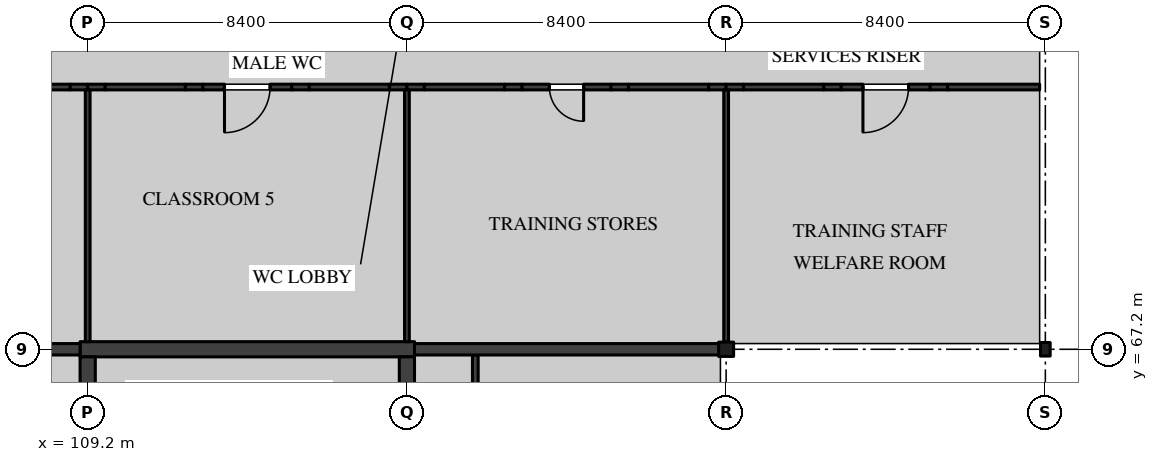
"""IFC4 building model, lengths in metres.
Left out: names, types, materials, properties, quantities, classifications, styles, units other than length and angle.
Written with IfcOpenShell. Run it as: python <this file> out.ifc"""

import sys

from ifc_helpers import new_model, si_unit, direction, frame, frame_2d, origin, origin_2d, place, context, subcontext, project, spatial, rectangle, i_section, extrude, element, fill, save


model = new_model("IFC4")
c1 = context("Model", 3, precision=1e-05, world=origin(), true_north=direction((0.0, 1.0)))
c2 = subcontext(c1, "Body", "Model", "MODEL_VIEW")
j1 = project(units=[si_unit("LENGTHUNIT", "METRE"), si_unit("PLANEANGLEUNIT", "RADIAN")], contexts=[c1])
p1 = place(None, origin())
s1 = spatial("IfcSite", under=j1, at=p1, CompositionType="ELEMENT")
p2 = place(p1, origin())
s2 = spatial("IfcBuilding", under=s1, at=p2, CompositionType="ELEMENT")
p3 = place(p2, frame((0.0, 0.0, 9.9)))
s3 = spatial("IfcBuildingStorey", under=s2, at=p3, CompositionType="ELEMENT", Elevation=9.9)
p4 = place(p3, frame((126.0, 67.2, 0.0), z_axis=(0.0, 0.0, 1.0), x_axis=(1.0, 0.0, 0.0)))
e1 = element("IfcColumn", 1, at=p4, inside=s3, PredefinedType="COLUMN", context=c2, shape_type="SweptSolid", body=[
    extrude(i_section(OverallWidth=0.394, OverallDepth=0.376, WebThickness=0.017, FlangeThickness=0.028, FilletRadius=0.015, at=origin_2d()), origin(), (0.0, 0.0, 1.0), 4.37),
])
p5 = place(p3, frame((134.4, 67.2, 0.0), z_axis=(0.0, 0.0, 1.0), x_axis=(1.0, 0.0, 0.0)))
e2 = element("IfcColumn", 2, at=p5, inside=s3, PredefinedType="COLUMN", context=c2, shape_type="SweptSolid", body=[
    extrude(i_section(OverallWidth=0.254, OverallDepth=0.356, WebThickness=0.01, FlangeThickness=0.018, FilletRadius=0.015, at=origin_2d()), origin(), (0.0, 0.0, 1.0), 4.37),
])
p6 = place(p3, frame((109.0, 67.2, 0.0), z_axis=(0.0, 0.0, 1.0), x_axis=(1.0, 0.0, 0.0)))
e3 = element("IfcWall", 3, at=p6, inside=s3, PredefinedType="SHEAR", context=c2, shape_type="SweptSolid", body=[
    extrude(rectangle(XDim=8.8, YDim=0.4, at=frame_2d((4.4, 0.0))), origin(), (0.0, 0.0, 1.0), 4.37),
])
p7 = place(p3, frame((109.2, 59.0, 0.0), z_axis=(0.0, 0.0, 1.0), x_axis=(0.0, 1.0, 0.0)))
e4 = element("IfcWall", 4, at=p7, inside=s3, PredefinedType="SHEAR", context=c2, shape_type="SweptSolid", body=[
    extrude(rectangle(XDim=8.0, YDim=0.4, at=frame_2d((4.0, 0.0))), origin(), (0.0, 0.0, 1.0), 4.37),
])
p8 = place(p7, frame((2.925, 0.0, 0.0)))
e5 = element("IfcOpeningElement", 5, at=p8, cuts=e4, PredefinedType="OPENING", context=c2, shape_type="SweptSolid", body=[
    extrude(rectangle(XDim=1.2, YDim=2.1, at=frame_2d((0.6, 1.05))), frame((0.0, 0.21, 0.0), z_axis=(0.0, -1.0, 0.0), x_axis=(1.0, 0.0, 0.0)), (0.0, 0.0, 1.0), 0.42),
])
p9 = place(p3, frame((117.6, 59.0, 0.0), z_axis=(0.0, 0.0, 1.0), x_axis=(0.0, 1.0, 0.0)))
e6 = element("IfcWall", 6, at=p9, inside=s3, PredefinedType="SHEAR", context=c2, shape_type="SweptSolid", body=[
    extrude(rectangle(XDim=8.0, YDim=0.4, at=frame_2d((4.0, 0.0))), origin(), (0.0, 0.0, 1.0), 4.37),
])
p10 = place(p9, frame((2.925, 0.0, 0.0)))
e7 = element("IfcOpeningElement", 7, at=p10, cuts=e6, PredefinedType="OPENING", context=c2, shape_type="SweptSolid", body=[
    extrude(rectangle(XDim=1.2, YDim=2.1, at=frame_2d((0.6, 1.05))), frame((0.0, 0.21, 0.0), z_axis=(0.0, -1.0, 0.0), x_axis=(1.0, 0.0, 0.0)), (0.0, 0.0, 1.0), 0.42),
])
p11 = place(p3, frame((119.4, 59.03, 0.0), z_axis=(0.0, 0.0, 1.0), x_axis=(0.0, 1.0, 0.0)))
e8 = element("IfcWall", 8, at=p11, inside=s3, PredefinedType="PARTITIONING", context=c2, shape_type="SweptSolid", body=[
    extrude(rectangle(XDim=8.02, YDim=0.15, at=frame_2d((4.01, 0.0))), origin(), (0.0, 0.0, 1.0), 4.37),
])
p12 = place(p11, frame((1.27, 0.0, 0.0)))
e9 = element("IfcOpeningElement", 9, at=p12, cuts=e8, PredefinedType="OPENING", context=c2, shape_type="SweptSolid", body=[
    extrude(rectangle(XDim=0.9, YDim=2.1, at=frame_2d((0.45, 1.05))), frame((0.0, 0.085, 0.0), z_axis=(0.0, -1.0, 0.0), x_axis=(1.0, 0.0, 0.0)), (0.0, 0.0, 1.0), 0.17),
])
p13 = place(p3, frame((106.63, 74.1, 0.0), z_axis=(0.0, 0.0, 1.0), x_axis=(1.0, 0.0, 0.0)))
e10 = element("IfcWall", 10, at=p13, inside=s3, PredefinedType="PARTITIONING", context=c2, shape_type="SweptSolid", body=[
    extrude(rectangle(XDim=2.11, YDim=0.15, at=frame_2d((1.055, 0.0))), origin(), (0.0, 0.0, 1.0), 4.37),
])
for number, where, z_axis, x_axis in (
    (11, (108.74, 74.1, 0.0), (0.0, 0.0, 1.0), (1.0, 0.0, 0.0)),
    (12, (109.2, 74.1, 0.0), (0.0, 0.0, 1.0), (1.0, 0.0, 0.0)),
):
    element("IfcWall", number, at=place(p3, frame(where, z_axis=z_axis, x_axis=x_axis)), inside=s3, PredefinedType="PARTITIONING", context=c2, shape_type="SweptSolid", body=[
        extrude(rectangle(XDim=0.46, YDim=0.15, at=frame_2d((0.23, 0.0))), origin(), (0.0, 0.0, 1.0), 3.746),
    ])
p14 = place(p3, frame((109.66, 74.1, 0.0), z_axis=(0.0, 0.0, 1.0), x_axis=(1.0, 0.0, 0.0)))
e13 = element("IfcWall", 13, at=p14, inside=s3, PredefinedType="PARTITIONING", context=c2, shape_type="SweptSolid", body=[
    extrude(rectangle(XDim=2.11, YDim=0.15, at=frame_2d((1.055, 0.0))), origin(), (0.0, 0.0, 1.0), 4.37),
])
p15 = place(p3, frame((111.77, 74.1, 0.0), z_axis=(0.0, 0.0, 1.0), x_axis=(1.0, 0.0, 0.0)))
e14 = element("IfcWall", 14, at=p15, inside=s3, PredefinedType="PARTITIONING", context=c2, shape_type="SweptSolid", body=[
    extrude(rectangle(XDim=0.46, YDim=0.15, at=frame_2d((0.23, 0.0))), origin(), (0.0, 0.0, 1.0), 3.895),
])
p16 = place(p3, frame((112.23, 74.1, 0.0), z_axis=(0.0, 0.0, 1.0), x_axis=(1.0, 0.0, 0.0)))
e15 = element("IfcWall", 15, at=p16, inside=s3, PredefinedType="PARTITIONING", context=c2, shape_type="SweptSolid", body=[
    extrude(rectangle(XDim=2.34, YDim=0.15, at=frame_2d((1.17, 0.0))), origin(), (0.0, 0.0, 1.0), 4.37),
])
p17 = place(p16, frame((0.57, 0.0, 0.0)))
e16 = element("IfcOpeningElement", 16, at=p17, cuts=e15, PredefinedType="OPENING", context=c2, shape_type="SweptSolid", body=[
    extrude(rectangle(XDim=1.2, YDim=2.4, at=frame_2d((0.6, 1.2))), frame((0.0, 0.085, 0.0), z_axis=(0.0, -1.0, 0.0), x_axis=(1.0, 0.0, 0.0)), (0.0, 0.0, 1.0), 0.17),
])
p18 = place(p3, frame((114.57, 74.1, 0.0), z_axis=(0.0, 0.0, 1.0), x_axis=(1.0, 0.0, 0.0)))
e17 = element("IfcWall", 17, at=p18, inside=s3, PredefinedType="PARTITIONING", context=c2, shape_type="SweptSolid", body=[
    extrude(rectangle(XDim=0.46, YDim=0.15, at=frame_2d((0.23, 0.0))), origin(), (0.0, 0.0, 1.0), 3.895),
])
p19 = place(p3, frame((115.03, 74.1, 0.0), z_axis=(0.0, 0.0, 1.0), x_axis=(1.0, 0.0, 0.0)))
e18 = element("IfcWall", 18, at=p19, inside=s3, PredefinedType="PARTITIONING", context=c2, shape_type="SweptSolid", body=[
    extrude(rectangle(XDim=2.11, YDim=0.15, at=frame_2d((1.055, 0.0))), origin(), (0.0, 0.0, 1.0), 4.37),
])
p20 = place(p3, frame((117.14, 74.1, 0.0), z_axis=(0.0, 0.0, 1.0), x_axis=(1.0, 0.0, 0.0)))
e19 = element("IfcWall", 19, at=p20, inside=s3, PredefinedType="PARTITIONING", context=c2, shape_type="SweptSolid", body=[
    extrude(rectangle(XDim=0.46, YDim=0.15, at=frame_2d((0.23, 0.0))), origin(), (0.0, 0.0, 1.0), 3.746),
])
p21 = place(p3, frame((117.6, 74.1, 0.0), z_axis=(0.0, 0.0, 1.0), x_axis=(1.0, 0.0, 0.0)))
e20 = element("IfcWall", 20, at=p21, inside=s3, PredefinedType="PARTITIONING", context=c2, shape_type="SweptSolid", body=[
    extrude(rectangle(XDim=0.46, YDim=0.15, at=frame_2d((0.23, 0.0))), origin(), (0.0, 0.0, 1.0), 3.746),
])
p22 = place(p3, frame((118.06, 74.1, 0.0), z_axis=(0.0, 0.0, 1.0), x_axis=(1.0, 0.0, 0.0)))
e21 = element("IfcWall", 21, at=p22, inside=s3, PredefinedType="PARTITIONING", context=c2, shape_type="SweptSolid", body=[
    extrude(rectangle(XDim=2.11, YDim=0.15, at=frame_2d((1.055, 0.0))), origin(), (0.0, 0.0, 1.0), 4.37),
])
p23 = place(p3, frame((120.17, 74.1, 0.0), z_axis=(0.0, 0.0, 1.0), x_axis=(1.0, 0.0, 0.0)))
e22 = element("IfcWall", 22, at=p23, inside=s3, PredefinedType="PARTITIONING", context=c2, shape_type="SweptSolid", body=[
    extrude(rectangle(XDim=0.46, YDim=0.15, at=frame_2d((0.23, 0.0))), origin(), (0.0, 0.0, 1.0), 3.895),
])
p24 = place(p3, frame((120.63, 74.1, 0.0), z_axis=(0.0, 0.0, 1.0), x_axis=(1.0, 0.0, 0.0)))
e23 = element("IfcWall", 23, at=p24, inside=s3, PredefinedType="PARTITIONING", context=c2, shape_type="SweptSolid", body=[
    extrude(rectangle(XDim=2.34, YDim=0.15, at=frame_2d((1.17, 0.0))), origin(), (0.0, 0.0, 1.0), 4.37),
])
p25 = place(p24, frame((0.72, 0.0, 0.0)))
e24 = element("IfcOpeningElement", 24, at=p25, cuts=e23, PredefinedType="OPENING", context=c2, shape_type="SweptSolid", body=[
    extrude(rectangle(XDim=0.9, YDim=2.1, at=frame_2d((0.45, 1.05))), frame((0.0, 0.085, 0.0), z_axis=(0.0, -1.0, 0.0), x_axis=(1.0, 0.0, 0.0)), (0.0, 0.0, 1.0), 0.17),
])
p26 = place(p3, frame((122.97, 74.1, 0.0), z_axis=(0.0, 0.0, 1.0), x_axis=(1.0, 0.0, 0.0)))
e25 = element("IfcWall", 25, at=p26, inside=s3, PredefinedType="PARTITIONING", context=c2, shape_type="SweptSolid", body=[
    extrude(rectangle(XDim=0.46, YDim=0.15, at=frame_2d((0.23, 0.0))), origin(), (0.0, 0.0, 1.0), 3.895),
])
p27 = place(p3, frame((123.43, 74.1, 0.0), z_axis=(0.0, 0.0, 1.0), x_axis=(1.0, 0.0, 0.0)))
e26 = element("IfcWall", 26, at=p27, inside=s3, PredefinedType="PARTITIONING", context=c2, shape_type="SweptSolid", body=[
    extrude(rectangle(XDim=2.11, YDim=0.15, at=frame_2d((1.055, 0.0))), origin(), (0.0, 0.0, 1.0), 4.37),
])
for number, where, z_axis, x_axis in (
    (27, (125.54, 74.1, 0.0), (0.0, 0.0, 1.0), (1.0, 0.0, 0.0)),
    (28, (126.0, 74.1, 0.0), (0.0, 0.0, 1.0), (1.0, 0.0, 0.0)),
):
    element("IfcWall", number, at=place(p3, frame(where, z_axis=z_axis, x_axis=x_axis)), inside=s3, PredefinedType="PARTITIONING", context=c2, shape_type="SweptSolid", body=[
        extrude(rectangle(XDim=0.46, YDim=0.15, at=frame_2d((0.23, 0.0))), origin(), (0.0, 0.0, 1.0), 3.746),
    ])
p28 = place(p3, frame((126.46, 74.1, 0.0), z_axis=(0.0, 0.0, 1.0), x_axis=(1.0, 0.0, 0.0)))
e29 = element("IfcWall", 29, at=p28, inside=s3, PredefinedType="PARTITIONING", context=c2, shape_type="SweptSolid", body=[
    extrude(rectangle(XDim=2.11, YDim=0.15, at=frame_2d((1.055, 0.0))), origin(), (0.0, 0.0, 1.0), 4.37),
])
p29 = place(p3, frame((128.57, 74.1, 0.0), z_axis=(0.0, 0.0, 1.0), x_axis=(1.0, 0.0, 0.0)))
e30 = element("IfcWall", 30, at=p29, inside=s3, PredefinedType="PARTITIONING", context=c2, shape_type="SweptSolid", body=[
    extrude(rectangle(XDim=0.46, YDim=0.15, at=frame_2d((0.23, 0.0))), origin(), (0.0, 0.0, 1.0), 3.895),
])
p30 = place(p3, frame((129.03, 74.1, 0.0), z_axis=(0.0, 0.0, 1.0), x_axis=(1.0, 0.0, 0.0)))
e31 = element("IfcWall", 31, at=p30, inside=s3, PredefinedType="PARTITIONING", context=c2, shape_type="SweptSolid", body=[
    extrude(rectangle(XDim=2.34, YDim=0.15, at=frame_2d((1.17, 0.0))), origin(), (0.0, 0.0, 1.0), 4.37),
])
p31 = place(p30, frame((0.57, 0.0, 0.0)))
e32 = element("IfcOpeningElement", 32, at=p31, cuts=e31, PredefinedType="OPENING", context=c2, shape_type="SweptSolid", body=[
    extrude(rectangle(XDim=1.2, YDim=2.4, at=frame_2d((0.6, 1.2))), frame((0.0, 0.085, 0.0), z_axis=(0.0, -1.0, 0.0), x_axis=(1.0, 0.0, 0.0)), (0.0, 0.0, 1.0), 0.17),
])
p32 = place(p3, frame((131.37, 74.1, 0.0), z_axis=(0.0, 0.0, 1.0), x_axis=(1.0, 0.0, 0.0)))
e33 = element("IfcWall", 33, at=p32, inside=s3, PredefinedType="PARTITIONING", context=c2, shape_type="SweptSolid", body=[
    extrude(rectangle(XDim=0.46, YDim=0.15, at=frame_2d((0.23, 0.0))), origin(), (0.0, 0.0, 1.0), 3.895),
])
p33 = place(p3, frame((131.83, 74.1, 0.0), z_axis=(0.0, 0.0, 1.0), x_axis=(1.0, 0.0, 0.0)))
e34 = element("IfcWall", 34, at=p33, inside=s3, PredefinedType="PARTITIONING", context=c2, shape_type="SweptSolid", body=[
    extrude(rectangle(XDim=2.42, YDim=0.15, at=frame_2d((1.21, 0.0))), origin(), (0.0, 0.0, 1.0), 4.37),
])
for number, where, z_axis, x_axis in (
    (35, (109.2, 67.4, 0.0), (0.0, 0.0, 1.0), (0.0, 1.0, 0.0)),
    (36, (117.6, 67.4, 0.0), (0.0, 0.0, 1.0), (0.0, 1.0, 0.0)),
):
    element("IfcWall", number, at=place(p3, frame(where, z_axis=z_axis, x_axis=x_axis)), inside=s3, PredefinedType="PARTITIONING", context=c2, shape_type="SweptSolid", body=[
        extrude(rectangle(XDim=6.625, YDim=0.125, at=frame_2d((3.312, 0.0))), origin(), (0.0, 0.0, 1.0), 3.746),
    ])
p34 = place(p3, frame((126.0, 67.388, 0.0), z_axis=(0.0, 0.0, 1.0), x_axis=(0.0, 1.0, 0.0)))
e37 = element("IfcWall", 37, at=p34, inside=s3, PredefinedType="PARTITIONING", context=c2, shape_type="SweptSolid", body=[
    extrude(rectangle(XDim=6.637, YDim=0.125, at=frame_2d((3.318, 0.0))), origin(), (0.0, 0.0, 1.0), 3.746),
])
for number, where, z_axis, x_axis in (
    (38, (125.999, 67.2, 0.0), (0.0, 0.0, 1.0), (-1.0, 0.0, 0.0)),
    (39, (109.0, 67.2, 0.0), (0.0, 0.0, 1.0), (-1.0, 0.0, 0.0)),
):
    element("IfcWall", number, at=place(p3, frame(where, z_axis=z_axis, x_axis=x_axis)), inside=s3, PredefinedType="SOLIDWALL", context=c2, shape_type="SweptSolid", body=[
        extrude(rectangle(XDim=8.198, YDim=0.3, at=frame_2d((4.099, 0.0))), origin(), (0.0, 0.0, 1.0), 3.746),
    ])
p35 = place(p17, frame((1.2, 0.0, 0.0), z_axis=(0.0, 0.0, 1.0), x_axis=(-1.0, 0.0, 0.0)))
e40 = element("IfcDoor", 40, at=p35, inside=s3, OperationType="SINGLE_SWING_LEFT", PredefinedType="DOOR", context=c2, shape_type="SweptSolid", body=[
    extrude(rectangle(XDim=1.2, YDim=2.4, at=frame_2d((0.6, 1.2))), frame((0.0, 0.025, 0.0), z_axis=(0.0, -1.0, 0.0), x_axis=(1.0, 0.0, 0.0)), (0.0, 0.0, 1.0), 0.05),
])
fill(e16, e40)
p36 = place(p25, frame((0.9, 0.0, 0.0), z_axis=(0.0, 0.0, 1.0), x_axis=(-1.0, 0.0, 0.0)))
e41 = element("IfcDoor", 41, at=p36, inside=s3, OperationType="SINGLE_SWING_RIGHT", PredefinedType="DOOR", context=c2, shape_type="SweptSolid", body=[
    extrude(rectangle(XDim=0.9, YDim=2.1, at=frame_2d((0.45, 1.05))), frame((0.0, 0.025, 0.0), z_axis=(0.0, -1.0, 0.0), x_axis=(1.0, 0.0, 0.0)), (0.0, 0.0, 1.0), 0.05),
])
fill(e24, e41)
p37 = place(p31, frame((1.2, 0.0, 0.0), z_axis=(0.0, 0.0, 1.0), x_axis=(-1.0, 0.0, 0.0)))
e42 = element("IfcDoor", 42, at=p37, inside=s3, OperationType="SINGLE_SWING_LEFT", PredefinedType="DOOR", context=c2, shape_type="SweptSolid", body=[
    extrude(rectangle(XDim=1.2, YDim=2.4, at=frame_2d((0.6, 1.2))), frame((0.0, 0.025, 0.0), z_axis=(0.0, -1.0, 0.0), x_axis=(1.0, 0.0, 0.0)), (0.0, 0.0, 1.0), 0.05),
])
fill(e32, e42)
save(model, sys.argv[1])
